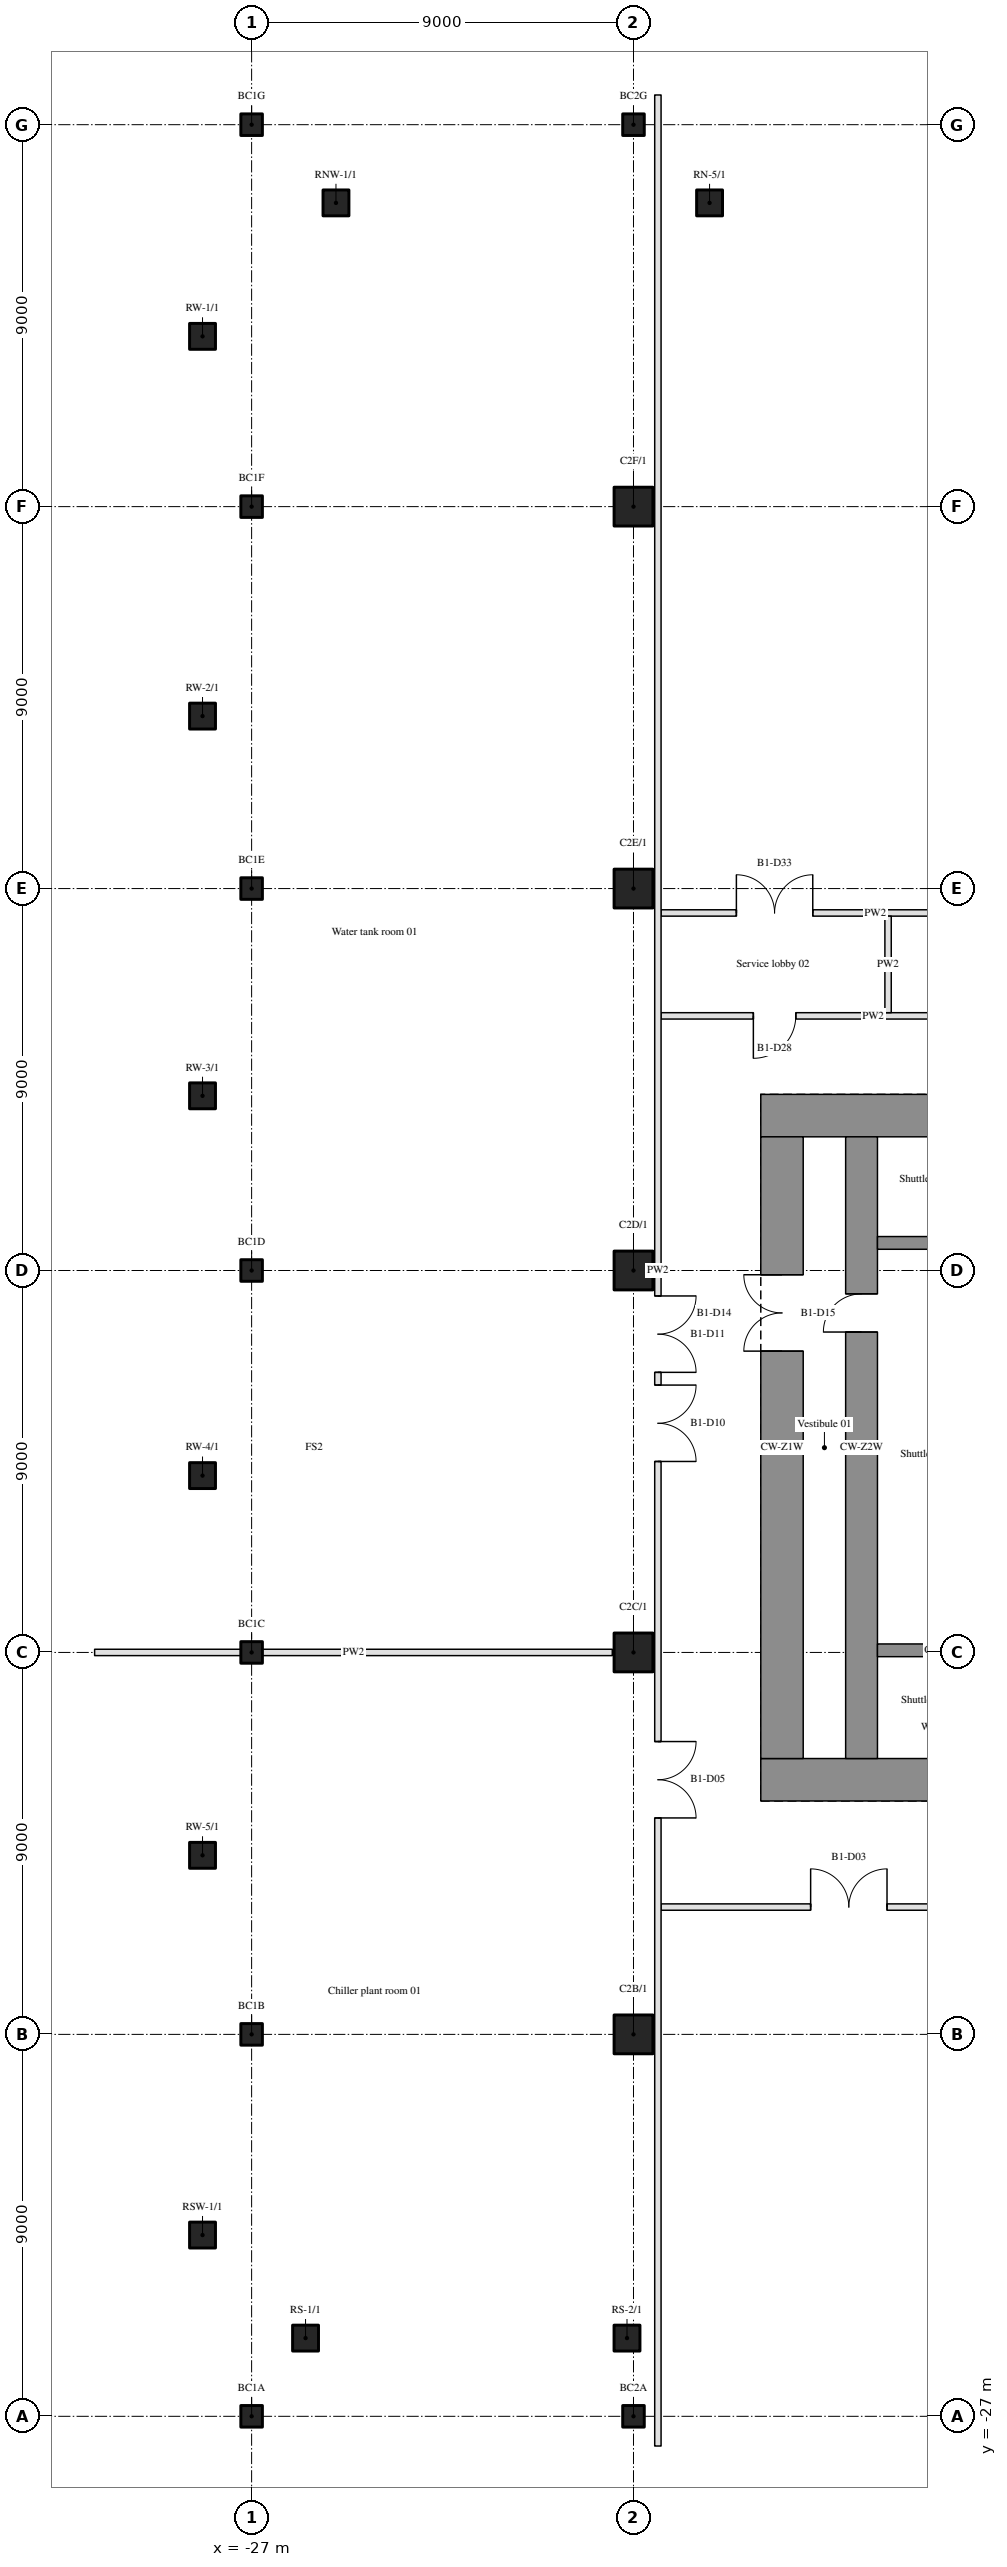
"""IFC4 building model, lengths in metres.
Left out: names, types, materials, properties, quantities, classifications, styles, units other than length and angle.
Written with IfcOpenShell. Run it as: python <this file> out.ifc"""

import sys

from ifc_helpers import new_model, si_unit, direction, frame, frame_2d, origin, origin_2d, place, context, subcontext, project, spatial, rectangle, hollow_circle, extrude, element, fill, save


model = new_model("IFC4")
c1 = context("Model", 3, precision=1e-05, world=origin(), true_north=direction((0.0, 1.0)))
c2 = subcontext(c1, "Body", "Model", "MODEL_VIEW")
j1 = project(units=[si_unit("LENGTHUNIT", "METRE"), si_unit("PLANEANGLEUNIT", "RADIAN")], contexts=[c1])
p1 = place(None, origin())
s1 = spatial("IfcSite", under=j1, at=p1, CompositionType="ELEMENT")
p2 = place(p1, origin())
s2 = spatial("IfcBuilding", under=s1, at=p2, CompositionType="ELEMENT")
p3 = place(p2, frame((0.0, 0.0, -5.0)))
s3 = spatial("IfcBuildingStorey", under=s2, at=p3, CompositionType="ELEMENT", Elevation=-5.0)
for number, where, z_axis, x_axis in (
    (1, (-30.129, 33.438, -0.25), (0.0, 0.0, 1.0), (-0.707, -0.707, 0.0)),
    (2, (-36.438, -27.129, -0.25), (0.0, 0.0, 1.0), (0.707, -0.707, 0.0)),
):
    element("IfcWall", number, at=place(p3, frame(where, z_axis=z_axis, x_axis=x_axis)), inside=s3, PredefinedType="SOLIDWALL", context=c2, shape_type="SweptSolid", body=[
        extrude(rectangle(XDim=8.922, YDim=0.6, at=frame_2d((4.461, 0.0))), origin(), (0.0, 0.0, 1.0), 4.8),
    ])
for number, where, z_axis, x_axis in (
    (3, (-18.0, -18.0, -0.25), (0.0, 0.0, 1.0), (1.0, 0.0, 0.0)),
    (4, (-18.0, -9.0, -0.25), (0.0, 0.0, 1.0), (1.0, 0.0, 0.0)),
    (5, (-18.0, 0.0, -0.25), (0.0, 0.0, 1.0), (1.0, 0.0, 0.0)),
    (6, (-18.0, 9.0, -0.25), (0.0, 0.0, 1.0), (1.0, 0.0, 0.0)),
    (7, (-18.0, 18.0, -0.25), (0.0, 0.0, 1.0), (1.0, 0.0, 0.0)),
):
    element("IfcColumn", number, at=place(p3, frame(where, z_axis=z_axis, x_axis=x_axis)), inside=s3, PredefinedType="COLUMN", context=c2, shape_type="SweptSolid", body=[
        extrude(hollow_circle(Radius=0.457, WallThickness=0.05, at=origin_2d()), origin(), (0.0, 0.0, 1.0), 5.25),
    ])
for number, where, z_axis, x_axis in (
    (8, (-25.729, -25.157, -0.25), (0.0, 0.0, 1.0), (1.0, 0.0, 0.0)),
    (9, (-18.153, -25.157, -0.25), (0.0, 0.0, 1.0), (1.0, 0.0, 0.0)),
    (10, (-16.207, 25.157, -0.25), (0.0, 0.0, 1.0), (1.0, 0.0, 0.0)),
    (11, (-25.012, 25.157, -0.25), (0.0, 0.0, 1.0), (1.0, 0.0, 0.0)),
    (12, (-28.157, 22.012, -0.25), (0.0, 0.0, 1.0), (1.0, 0.0, 0.0)),
    (13, (-28.157, 13.064, -0.25), (0.0, 0.0, 1.0), (1.0, 0.0, 0.0)),
    (14, (-28.157, 4.116, -0.25), (0.0, 0.0, 1.0), (1.0, 0.0, 0.0)),
    (15, (-28.157, -4.833, -0.25), (0.0, 0.0, 1.0), (1.0, 0.0, 0.0)),
    (16, (-28.157, -13.781, -0.25), (0.0, 0.0, 1.0), (1.0, 0.0, 0.0)),
    (17, (-28.157, -22.729, -0.25), (0.0, 0.0, 1.0), (1.0, 0.0, 0.0)),
):
    element("IfcColumn", number, at=place(p3, frame(where, z_axis=z_axis, x_axis=x_axis)), inside=s3, PredefinedType="COLUMN", context=c2, shape_type="SweptSolid", body=[
        extrude(hollow_circle(Radius=0.305, WallThickness=0.03, at=origin_2d()), origin(), (0.0, 0.0, 1.0), 5.25),
    ])
for number, where, z_axis, x_axis in (
    (18, (-27.0, -27.0, -0.25), (0.0, 0.0, 1.0), (1.0, 0.0, 0.0)),
    (19, (-27.0, -18.0, -0.25), (0.0, 0.0, 1.0), (1.0, 0.0, 0.0)),
    (20, (-27.0, -9.0, -0.25), (0.0, 0.0, 1.0), (1.0, 0.0, 0.0)),
    (21, (-27.0, 0.0, -0.25), (0.0, 0.0, 1.0), (1.0, 0.0, 0.0)),
    (22, (-27.0, 9.0, -0.25), (0.0, 0.0, 1.0), (1.0, 0.0, 0.0)),
    (23, (-27.0, 18.0, -0.25), (0.0, 0.0, 1.0), (1.0, 0.0, 0.0)),
    (24, (-27.0, 27.0, -0.25), (0.0, 0.0, 1.0), (1.0, 0.0, 0.0)),
    (25, (-18.0, -27.0, -0.25), (0.0, 0.0, 1.0), (1.0, 0.0, 0.0)),
    (26, (-18.0, 27.0, -0.25), (0.0, 0.0, 1.0), (1.0, 0.0, 0.0)),
):
    element("IfcColumn", number, at=place(p3, frame(where, z_axis=z_axis, x_axis=x_axis)), inside=s3, PredefinedType="COLUMN", context=c2, shape_type="SweptSolid", body=[
        extrude(hollow_circle(Radius=0.254, WallThickness=0.03, at=origin_2d()), origin(), (0.0, 0.0, 1.0), 4.8),
    ])
for number, where, z_axis, x_axis in (
    (27, (-15.0, -12.0, -0.25), (0.0, 0.0, 1.0), (1.0, 0.0, 0.0)),
    (28, (-15.0, 3.65, -0.25), (0.0, 0.0, 1.0), (1.0, 0.0, 0.0)),
):
    element("IfcWall", number, at=place(p3, frame(where, z_axis=z_axis, x_axis=x_axis)), inside=s3, PredefinedType="SHEAR", context=c2, shape_type="SweptSolid", body=[
        extrude(rectangle(XDim=30.0, YDim=1.0, at=frame_2d((15.0, 0.0))), origin(), (0.0, 0.0, 1.0), 5.25),
    ])
p4 = place(p3, frame((-14.5, -11.5, -0.25), z_axis=(0.0, 0.0, 1.0), x_axis=(0.0, 1.0, 0.0)))
e29 = element("IfcWall", 29, at=p4, inside=s3, PredefinedType="SHEAR", context=c2, shape_type="SweptSolid", body=[
    extrude(rectangle(XDim=14.65, YDim=1.0, at=frame_2d((7.325, 0.0))), origin(), (0.0, 0.0, 1.0), 5.25),
])
p5 = place(p4, frame((9.6, 0.0, 0.0)))
e30 = element("IfcOpeningElement", 30, at=p5, cuts=e29, PredefinedType="OPENING", context=c2, shape_type="SweptSolid", body=[
    extrude(rectangle(XDim=1.8, YDim=2.1, at=frame_2d((0.9, 1.05))), frame((0.0, 0.51, 0.0), z_axis=(0.0, -1.0, 0.0), x_axis=(1.0, 0.0, 0.0)), (0.0, 0.0, 1.0), 1.02),
])
p6 = place(p3, frame((-12.625, -11.5, -0.25), z_axis=(0.0, 0.0, 1.0), x_axis=(0.0, 1.0, 0.0)))
e31 = element("IfcWall", 31, at=p6, inside=s3, PredefinedType="SHEAR", context=c2, shape_type="SweptSolid", body=[
    extrude(rectangle(XDim=14.65, YDim=0.75, at=frame_2d((7.325, 0.0))), origin(), (0.0, 0.0, 1.0), 5.25),
])
p7 = place(p6, frame((10.05, 0.0, 0.0)))
e32 = element("IfcOpeningElement", 32, at=p7, cuts=e31, PredefinedType="OPENING", context=c2, shape_type="SweptSolid", body=[
    extrude(rectangle(XDim=0.9, YDim=2.1, at=frame_2d((0.45, 1.05))), frame((0.0, 0.385, 0.0), z_axis=(0.0, -1.0, 0.0), x_axis=(1.0, 0.0, 0.0)), (0.0, 0.0, 1.0), 0.77),
])
p8 = place(p3, frame((-17.35, -15.0, 0.0), z_axis=(0.0, 0.0, 1.0), x_axis=(1.0, 0.0, 0.0)))
e33 = element("IfcWall", 33, at=p8, inside=s3, PredefinedType="PARTITIONING", context=c2, shape_type="SweptSolid", body=[
    extrude(rectangle(XDim=34.7, YDim=0.15, at=frame_2d((17.35, 0.0))), origin(), (0.0, 0.0, 1.0), 4.06),
])
p9 = place(p8, frame((3.525, 0.0, 0.0)))
e34 = element("IfcOpeningElement", 34, at=p9, cuts=e33, PredefinedType="OPENING", context=c2, shape_type="SweptSolid", body=[
    extrude(rectangle(XDim=1.8, YDim=2.1, at=frame_2d((0.9, 1.05))), frame((0.0, 0.085, 0.0), z_axis=(0.0, -1.0, 0.0), x_axis=(1.0, 0.0, 0.0)), (0.0, 0.0, 1.0), 0.17),
])
p10 = place(p8, frame((29.375, 0.0, 0.0)))
e35 = element("IfcOpeningElement", 35, at=p10, cuts=e33, PredefinedType="OPENING", context=c2, shape_type="SweptSolid", body=[
    extrude(rectangle(XDim=1.8, YDim=2.1, at=frame_2d((0.9, 1.05))), frame((0.0, 0.085, 0.0), z_axis=(0.0, -1.0, 0.0), x_axis=(1.0, 0.0, 0.0)), (0.0, 0.0, 1.0), 0.17),
])
p11 = place(p3, frame((-30.7, -9.0, 0.0), z_axis=(0.0, 0.0, 1.0), x_axis=(1.0, 0.0, 0.0)))
e36 = element("IfcWall", 36, at=p11, inside=s3, PredefinedType="PARTITIONING", context=c2, shape_type="SweptSolid", body=[
    extrude(rectangle(XDim=12.2, YDim=0.15, at=frame_2d((6.1, 0.0))), origin(), (0.0, 0.0, 1.0), 4.06),
])
p12 = place(p3, frame((-12.25, -8.95, 0.0), z_axis=(0.0, 0.0, 1.0), x_axis=(1.0, 0.0, 0.0)))
e37 = element("IfcWall", 37, at=p12, inside=s3, PredefinedType="SHEAR", context=c2, shape_type="SweptSolid", body=[
    extrude(rectangle(XDim=2.75, YDim=0.3, at=frame_2d((1.375, 0.0))), origin(), (0.0, 0.0, 1.0), 5.0),
])
p13 = place(p3, frame((-9.0, 0.65, 0.0), z_axis=(0.0, 0.0, 1.0), x_axis=(-1.0, 0.0, 0.0)))
e38 = element("IfcWall", 38, at=p13, inside=s3, PredefinedType="SHEAR", context=c2, shape_type="SweptSolid", body=[
    extrude(rectangle(XDim=3.25, YDim=0.3, at=frame_2d((1.625, 0.0))), origin(), (0.0, 0.0, 1.0), 5.0),
])
p14 = place(p3, frame((-7.35, 6.0, 0.0), z_axis=(0.0, 0.0, 1.0), x_axis=(-1.0, 0.0, 0.0)))
e39 = element("IfcWall", 39, at=p14, inside=s3, PredefinedType="PARTITIONING", context=c2, shape_type="SweptSolid", body=[
    extrude(rectangle(XDim=10.0, YDim=0.15, at=frame_2d((5.0, 0.0))), origin(), (0.0, 0.0, 1.0), 4.06),
])
p15 = place(p14, frame((6.825, 0.0, 0.0)))
e40 = element("IfcOpeningElement", 40, at=p15, cuts=e39, PredefinedType="OPENING", context=c2, shape_type="SweptSolid", body=[
    extrude(rectangle(XDim=1.0, YDim=2.1, at=frame_2d((0.5, 1.05))), frame((0.0, 0.085, 0.0), z_axis=(0.0, -1.0, 0.0), x_axis=(1.0, 0.0, 0.0)), (0.0, 0.0, 1.0), 0.17),
])
p16 = place(p14, frame((1.875, 0.0, 0.0)))
e41 = element("IfcOpeningElement", 41, at=p16, cuts=e39, PredefinedType="OPENING", context=c2, shape_type="SweptSolid", body=[
    extrude(rectangle(XDim=0.9, YDim=2.1, at=frame_2d((0.45, 1.05))), frame((0.0, 0.085, 0.0), z_axis=(0.0, -1.0, 0.0), x_axis=(1.0, 0.0, 0.0)), (0.0, 0.0, 1.0), 0.17),
])
p17 = place(p3, frame((-17.35, 8.425, 0.0), z_axis=(0.0, 0.0, 1.0), x_axis=(1.0, 0.0, 0.0)))
e42 = element("IfcWall", 42, at=p17, inside=s3, PredefinedType="PARTITIONING", context=c2, shape_type="SweptSolid", body=[
    extrude(rectangle(XDim=10.1, YDim=0.15, at=frame_2d((5.05, 0.0))), origin(), (0.0, 0.0, 1.0), 4.06),
])
p18 = place(p17, frame((1.775, 0.0, 0.0)))
e43 = element("IfcOpeningElement", 43, at=p18, cuts=e42, PredefinedType="OPENING", context=c2, shape_type="SweptSolid", body=[
    extrude(rectangle(XDim=1.8, YDim=2.1, at=frame_2d((0.9, 1.05))), frame((0.0, 0.085, 0.0), z_axis=(0.0, -1.0, 0.0), x_axis=(1.0, 0.0, 0.0)), (0.0, 0.0, 1.0), 0.17),
])
p19 = place(p3, frame((-17.425, 27.7, 0.0), z_axis=(0.0, 0.0, 1.0), x_axis=(0.0, -1.0, 0.0)))
e44 = element("IfcWall", 44, at=p19, inside=s3, PredefinedType="PARTITIONING", context=c2, shape_type="SweptSolid", body=[
    extrude(rectangle(XDim=55.4, YDim=0.15, at=frame_2d((27.7, 0.0))), origin(), (0.0, 0.0, 1.0), 4.06),
])
p20 = place(p19, frame((38.8, 0.0, 0.0)))
e45 = element("IfcOpeningElement", 45, at=p20, cuts=e44, PredefinedType="OPENING", context=c2, shape_type="SweptSolid", body=[
    extrude(rectangle(XDim=1.8, YDim=2.1, at=frame_2d((0.9, 1.05))), frame((0.0, 0.085, 0.0), z_axis=(0.0, -1.0, 0.0), x_axis=(1.0, 0.0, 0.0)), (0.0, 0.0, 1.0), 0.17),
])
p21 = place(p19, frame((28.3, 0.0, 0.0)))
e46 = element("IfcOpeningElement", 46, at=p21, cuts=e44, PredefinedType="OPENING", context=c2, shape_type="SweptSolid", body=[
    extrude(rectangle(XDim=1.8, YDim=2.1, at=frame_2d((0.9, 1.05))), frame((0.0, 0.085, 0.0), z_axis=(0.0, -1.0, 0.0), x_axis=(1.0, 0.0, 0.0)), (0.0, 0.0, 1.0), 0.17),
])
p22 = place(p19, frame((30.4, 0.0, 0.0)))
e47 = element("IfcOpeningElement", 47, at=p22, cuts=e44, PredefinedType="OPENING", context=c2, shape_type="SweptSolid", body=[
    extrude(rectangle(XDim=1.8, YDim=2.1, at=frame_2d((0.9, 1.05))), frame((0.0, 0.085, 0.0), z_axis=(0.0, -1.0, 0.0), x_axis=(1.0, 0.0, 0.0)), (0.0, 0.0, 1.0), 0.17),
])
p23 = place(p3, frame((-12.0, 6.075, 0.0), z_axis=(0.0, 0.0, 1.0), x_axis=(0.0, 1.0, 0.0)))
e48 = element("IfcWall", 48, at=p23, inside=s3, PredefinedType="PARTITIONING", context=c2, shape_type="SweptSolid", body=[
    extrude(rectangle(XDim=2.275, YDim=0.15, at=frame_2d((1.138, 0.0))), origin(), (0.0, 0.0, 1.0), 4.06),
])
p24 = place(p9, origin())
e49 = element("IfcDoor", 49, at=p24, inside=s3, OperationType="DOUBLE_DOOR_SINGLE_SWING", PredefinedType="DOOR", context=c2, shape_type="SweptSolid", body=[
    extrude(rectangle(XDim=1.8, YDim=2.1, at=frame_2d((0.9, 1.05))), frame((0.0, 0.025, 0.0), z_axis=(0.0, -1.0, 0.0), x_axis=(1.0, 0.0, 0.0)), (0.0, 0.0, 1.0), 0.05),
])
fill(e34, e49)
p25 = place(p15, origin())
e50 = element("IfcDoor", 50, at=p25, inside=s3, OperationType="SINGLE_SWING_RIGHT", PredefinedType="DOOR", context=c2, shape_type="SweptSolid", body=[
    extrude(rectangle(XDim=1.0, YDim=2.1, at=frame_2d((0.5, 1.05))), frame((0.0, 0.025, 0.0), z_axis=(0.0, -1.0, 0.0), x_axis=(1.0, 0.0, 0.0)), (0.0, 0.0, 1.0), 0.05),
])
fill(e40, e50)
p26 = place(p5, origin())
e51 = element("IfcDoor", 51, at=p26, inside=s3, OperationType="DOUBLE_DOOR_SINGLE_SWING", PredefinedType="DOOR", context=c2, shape_type="SweptSolid", body=[
    extrude(rectangle(XDim=1.8, YDim=2.1, at=frame_2d((0.9, 1.05))), frame((0.0, 0.025, 0.0), z_axis=(0.0, -1.0, 0.0), x_axis=(1.0, 0.0, 0.0)), (0.0, 0.0, 1.0), 0.05),
])
fill(e30, e51)
p27 = place(p20, origin())
e52 = element("IfcDoor", 52, at=p27, inside=s3, OperationType="DOUBLE_DOOR_SINGLE_SWING", PredefinedType="DOOR", context=c2, shape_type="SweptSolid", body=[
    extrude(rectangle(XDim=1.8, YDim=2.1, at=frame_2d((0.9, 1.05))), frame((0.0, 0.025, 0.0), z_axis=(0.0, -1.0, 0.0), x_axis=(1.0, 0.0, 0.0)), (0.0, 0.0, 1.0), 0.05),
])
fill(e45, e52)
p28 = place(p21, origin())
e53 = element("IfcDoor", 53, at=p28, inside=s3, OperationType="DOUBLE_DOOR_SINGLE_SWING", PredefinedType="DOOR", context=c2, shape_type="SweptSolid", body=[
    extrude(rectangle(XDim=1.8, YDim=2.1, at=frame_2d((0.9, 1.05))), frame((0.0, 0.025, 0.0), z_axis=(0.0, -1.0, 0.0), x_axis=(1.0, 0.0, 0.0)), (0.0, 0.0, 1.0), 0.05),
])
fill(e46, e53)
p29 = place(p22, origin())
e54 = element("IfcDoor", 54, at=p29, inside=s3, OperationType="DOUBLE_DOOR_SINGLE_SWING", PredefinedType="DOOR", context=c2, shape_type="SweptSolid", body=[
    extrude(rectangle(XDim=1.8, YDim=2.1, at=frame_2d((0.9, 1.05))), frame((0.0, 0.025, 0.0), z_axis=(0.0, -1.0, 0.0), x_axis=(1.0, 0.0, 0.0)), (0.0, 0.0, 1.0), 0.05),
])
fill(e47, e54)
p30 = place(p18, origin())
e55 = element("IfcDoor", 55, at=p30, inside=s3, OperationType="DOUBLE_DOOR_SINGLE_SWING", PredefinedType="DOOR", context=c2, shape_type="SweptSolid", body=[
    extrude(rectangle(XDim=1.8, YDim=2.1, at=frame_2d((0.9, 1.05))), frame((0.0, 0.025, 0.0), z_axis=(0.0, -1.0, 0.0), x_axis=(1.0, 0.0, 0.0)), (0.0, 0.0, 1.0), 0.05),
])
fill(e43, e55)
p31 = place(p7, origin())
e56 = element("IfcDoor", 56, at=p31, inside=s3, OperationType="SINGLE_SWING_LEFT", PredefinedType="DOOR", context=c2, shape_type="SweptSolid", body=[
    extrude(rectangle(XDim=0.9, YDim=2.1, at=frame_2d((0.45, 1.05))), frame((0.0, 0.025, 0.0), z_axis=(0.0, -1.0, 0.0), x_axis=(1.0, 0.0, 0.0)), (0.0, 0.0, 1.0), 0.05),
])
fill(e32, e56)
save(model, sys.argv[1])
